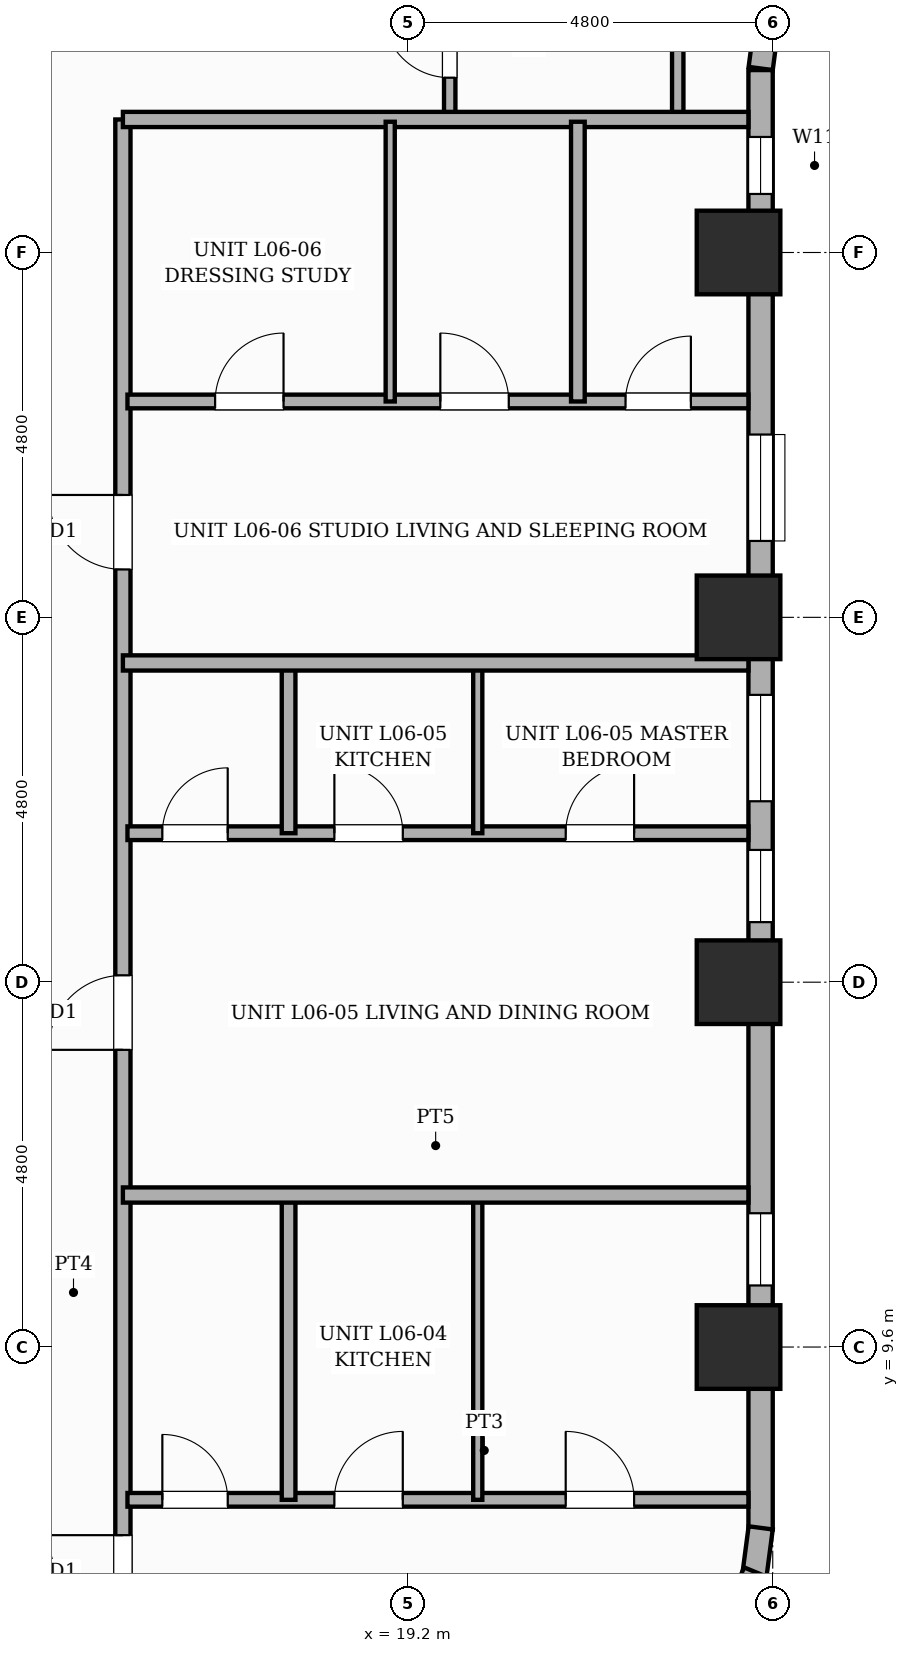
"""IFC4 building model, lengths in metres.
Left out: names, types, materials, properties, quantities, classifications, styles, units other than length and angle.
Written with IfcOpenShell. Run it as: python <this file> out.ifc"""

import sys

from ifc_helpers import new_model, si_unit, direction, frame, frame_2d, origin, origin_2d, place, context, subcontext, project, spatial, rectangle, extrude, element, fill, save


model = new_model("IFC4")
c1 = context("Model", 3, precision=1e-05, world=origin(), true_north=direction((0.0, 1.0)))
c2 = subcontext(c1, "Body", "Model", "MODEL_VIEW")
j1 = project(units=[si_unit("LENGTHUNIT", "METRE"), si_unit("PLANEANGLEUNIT", "RADIAN")], contexts=[c1])
p1 = place(None, origin())
s1 = spatial("IfcSite", under=j1, at=p1, CompositionType="ELEMENT")
p2 = place(p1, origin())
s2 = spatial("IfcBuilding", under=s1, at=p2, CompositionType="ELEMENT")
p3 = place(p2, frame((0.0, 0.0, 28.6)))
s3 = spatial("IfcBuildingStorey", under=s2, at=p3, CompositionType="ELEMENT", Elevation=28.6)
for number, where, z_axis, x_axis in (
    (1, (23.55, 9.6, 0.0), (0.0, 0.0, 1.0), (1.0, 0.0, 0.0)),
    (2, (23.55, 14.4, 0.0), (0.0, 0.0, 1.0), (1.0, 0.0, 0.0)),
    (3, (23.55, 19.2, 0.0), (0.0, 0.0, 1.0), (1.0, 0.0, 0.0)),
    (4, (23.55, 24.0, 0.0), (0.0, 0.0, 1.0), (1.0, 0.0, 0.0)),
):
    element("IfcColumn", number, at=place(p3, frame(where, z_axis=z_axis, x_axis=x_axis)), inside=s3, PredefinedType="COLUMN", context=c2, shape_type="SweptSolid", body=[
        extrude(rectangle(XDim=1.1, YDim=1.1, at=origin_2d()), origin(), (0.0, 0.0, 1.0), 3.6),
    ])
p4 = place(p3, frame((23.923, 27.042, 0.0), z_axis=(0.0, 0.0, 1.0), x_axis=(-0.130555323746, -0.9914410257, 0.0)))
e5 = element("IfcWall", 5, at=p4, inside=s3, PredefinedType="STANDARD", context=c2, shape_type="SweptSolid", body=[
    extrude(rectangle(XDim=0.626, YDim=0.32, at=frame_2d((0.313, 0.0))), origin(), (0.0, 0.0, 1.0), 2.53),
])
p5 = place(p3, frame((23.84, 26.4, 0.0), z_axis=(0.0, 0.0, 1.0), x_axis=(0.0, -1.0, 0.0)))
e6 = element("IfcWall", 6, at=p5, inside=s3, PredefinedType="STANDARD", context=c2, shape_type="SweptSolid", body=[
    extrude(rectangle(XDim=19.2, YDim=0.32, at=frame_2d((9.6, 0.0))), origin(), (0.0, 0.0, 1.0), 2.53),
])
p6 = place(p5, frame((15.04, 0.0, 0.45)))
e7 = element("IfcOpeningElement", 7, at=p6, cuts=e6, PredefinedType="OPENING", context=c2, shape_type="SweptSolid", body=[
    extrude(rectangle(XDim=0.95, YDim=1.8, at=frame_2d((0.475, 0.9))), frame((0.0, 0.17, 0.0), z_axis=(0.0, -1.0, 0.0), x_axis=(1.0, 0.0, 0.0)), (0.0, 0.0, 1.0), 0.34),
])
p7 = place(p5, frame((8.22, 0.0, 0.65)))
e8 = element("IfcOpeningElement", 8, at=p7, cuts=e6, PredefinedType="OPENING", context=c2, shape_type="SweptSolid", body=[
    extrude(rectangle(XDim=1.4, YDim=1.1, at=frame_2d((0.7, 0.55))), frame((0.0, 0.17, 0.0), z_axis=(0.0, -1.0, 0.0), x_axis=(1.0, 0.0, 0.0)), (0.0, 0.0, 1.0), 0.34),
])
p8 = place(p5, frame((4.795, 0.0, 0.65)))
e9 = element("IfcOpeningElement", 9, at=p8, cuts=e6, PredefinedType="OPENING", context=c2, shape_type="SweptSolid", body=[
    extrude(rectangle(XDim=1.4, YDim=1.1, at=frame_2d((0.7, 0.55))), frame((0.0, 0.17, 0.0), z_axis=(0.0, -1.0, 0.0), x_axis=(1.0, 0.0, 0.0)), (0.0, 0.0, 1.0), 0.34),
])
p9 = place(p5, frame((10.26, 0.0, 0.45)))
e10 = element("IfcOpeningElement", 10, at=p9, cuts=e6, PredefinedType="OPENING", context=c2, shape_type="SweptSolid", body=[
    extrude(rectangle(XDim=0.95, YDim=1.8, at=frame_2d((0.475, 0.9))), frame((0.0, 0.17, 0.0), z_axis=(0.0, -1.0, 0.0), x_axis=(1.0, 0.0, 0.0)), (0.0, 0.0, 1.0), 0.34),
])
p10 = place(p5, frame((0.88, 0.0, 0.45)))
e11 = element("IfcOpeningElement", 11, at=p10, cuts=e6, PredefinedType="OPENING", context=c2, shape_type="SweptSolid", body=[
    extrude(rectangle(XDim=0.75, YDim=1.8, at=frame_2d((0.375, 0.9))), frame((0.0, 0.17, 0.0), z_axis=(0.0, -1.0, 0.0), x_axis=(1.0, 0.0, 0.0)), (0.0, 0.0, 1.0), 0.34),
])
p11 = place(p3, frame((23.841, 7.221, 0.0), z_axis=(0.0, 0.0, 1.0), x_axis=(-0.130504898859, -0.991447664465, 0.0)))
e12 = element("IfcWall", 12, at=p11, inside=s3, PredefinedType="STANDARD", context=c2, shape_type="SweptSolid", body=[
    extrude(rectangle(XDim=0.627, YDim=0.32, at=frame_2d((0.313, 0.0))), origin(), (0.0, 0.0, 1.0), 3.35),
])
p12 = place(p3, frame((23.771, 6.64, 0.0), z_axis=(0.0, 0.0, 1.0), x_axis=(-0.382787856107, -0.923836271867, 0.0)))
e13 = element("IfcWall", 13, at=p12, inside=s3, PredefinedType="STANDARD", context=c2, shape_type="SweptSolid", body=[
    extrude(rectangle(XDim=0.626, YDim=0.32, at=frame_2d((0.313, 0.0))), origin(), (0.0, 0.0, 1.0), 3.35),
])
p13 = place(p3, frame((19.75, 25.75, 0.0), z_axis=(0.0, 0.0, 1.0), x_axis=(0.0, 1.0, 0.0)))
e14 = element("IfcWall", 14, at=p13, inside=s3, PredefinedType="PARTITIONING", context=c2, shape_type="SweptSolid", body=[
    extrude(rectangle(XDim=2.25, YDim=0.15, at=frame_2d((1.125, 0.0))), origin(), (0.0, 0.0, 1.0), 3.35),
])
p14 = place(p13, frame((0.55, 0.0, 0.0)))
e15 = element("IfcOpeningElement", 15, at=p14, cuts=e14, PredefinedType="OPENING", context=c2, shape_type="SweptSolid", body=[
    extrude(rectangle(XDim=0.88, YDim=2.1, at=frame_2d((0.44, 1.05))), frame((0.0, 0.085, 0.0), z_axis=(0.0, -1.0, 0.0), x_axis=(1.0, 0.0, 0.0)), (0.0, 0.0, 1.0), 0.17),
])
p15 = place(p3, frame((22.75, 25.75, 0.0), z_axis=(0.0, 0.0, 1.0), x_axis=(0.0, 1.0, 0.0)))
e16 = element("IfcWall", 16, at=p15, inside=s3, PredefinedType="PARTITIONING", context=c2, shape_type="SweptSolid", body=[
    extrude(rectangle(XDim=2.25, YDim=0.15, at=frame_2d((1.125, 0.0))), origin(), (0.0, 0.0, 1.0), 3.35),
])
p16 = place(p3, frame((15.45, 5.12, 0.0), z_axis=(0.0, 0.0, 1.0), x_axis=(0.0, 1.0, 0.0)))
e17 = element("IfcWall", 17, at=p16, inside=s3, PredefinedType="PARTITIONING", context=c2, shape_type="SweptSolid", body=[
    extrude(rectangle(XDim=20.63, YDim=0.2, at=frame_2d((10.315, 0.0))), origin(), (0.0, 0.0, 1.0), 3.35),
])
p17 = place(p16, frame((1.025, 0.0, 0.0)))
e18 = element("IfcOpeningElement", 18, at=p17, cuts=e17, PredefinedType="OPENING", context=c2, shape_type="SweptSolid", body=[
    extrude(rectangle(XDim=0.98, YDim=2.18, at=frame_2d((0.49, 1.09))), frame((0.0, 0.11, 0.0), z_axis=(0.0, -1.0, 0.0), x_axis=(1.0, 0.0, 0.0)), (0.0, 0.0, 1.0), 0.22),
])
p18 = place(p16, frame((8.39, 0.0, 0.0)))
e19 = element("IfcOpeningElement", 19, at=p18, cuts=e17, PredefinedType="OPENING", context=c2, shape_type="SweptSolid", body=[
    extrude(rectangle(XDim=0.98, YDim=2.18, at=frame_2d((0.49, 1.09))), frame((0.0, 0.11, 0.0), z_axis=(0.0, -1.0, 0.0), x_axis=(1.0, 0.0, 0.0)), (0.0, 0.0, 1.0), 0.22),
])
p19 = place(p16, frame((14.71, 0.0, 0.0)))
e20 = element("IfcOpeningElement", 20, at=p19, cuts=e17, PredefinedType="OPENING", context=c2, shape_type="SweptSolid", body=[
    extrude(rectangle(XDim=0.98, YDim=2.18, at=frame_2d((0.49, 1.09))), frame((0.0, 0.11, 0.0), z_axis=(0.0, -1.0, 0.0), x_axis=(1.0, 0.0, 0.0)), (0.0, 0.0, 1.0), 0.22),
])
p20 = place(p3, frame((15.45, 25.75, 0.0), z_axis=(0.0, 0.0, 1.0), x_axis=(1.0, 0.0, 0.0)))
e21 = element("IfcWall", 21, at=p20, inside=s3, PredefinedType="PARTITIONING", context=c2, shape_type="SweptSolid", body=[
    extrude(rectangle(XDim=8.23, YDim=0.2, at=frame_2d((4.115, 0.0))), origin(), (0.0, 0.0, 1.0), 3.35),
])
p21 = place(p3, frame((15.51, 7.59, 0.0), z_axis=(0.0, 0.0, 1.0), x_axis=(1.0, 0.0, 0.0)))
e22 = element("IfcWall", 22, at=p21, inside=s3, PredefinedType="PLUMBINGWALL", context=c2, shape_type="SweptSolid", body=[
    extrude(rectangle(XDim=8.17, YDim=0.18, at=frame_2d((4.085, 0.0))), origin(), (0.0, 0.0, 1.0), 3.35),
])
p22 = place(p21, frame((0.459, 0.0, 0.0)))
e23 = element("IfcOpeningElement", 23, at=p22, cuts=e22, PredefinedType="OPENING", context=c2, shape_type="SweptSolid", body=[
    extrude(rectangle(XDim=0.86, YDim=2.1, at=frame_2d((0.43, 1.05))), frame((0.0, 0.1, 0.0), z_axis=(0.0, -1.0, 0.0), x_axis=(1.0, 0.0, 0.0)), (0.0, 0.0, 1.0), 0.2),
])
p23 = place(p21, frame((2.722, 0.0, 0.0)))
e24 = element("IfcOpeningElement", 24, at=p23, cuts=e22, PredefinedType="OPENING", context=c2, shape_type="SweptSolid", body=[
    extrude(rectangle(XDim=0.9, YDim=2.15, at=frame_2d((0.45, 1.075))), frame((0.0, 0.1, 0.0), z_axis=(0.0, -1.0, 0.0), x_axis=(1.0, 0.0, 0.0)), (0.0, 0.0, 1.0), 0.2),
])
p24 = place(p21, frame((5.766, 0.0, 0.0)))
e25 = element("IfcOpeningElement", 25, at=p24, cuts=e22, PredefinedType="OPENING", context=c2, shape_type="SweptSolid", body=[
    extrude(rectangle(XDim=0.9, YDim=2.15, at=frame_2d((0.45, 1.075))), frame((0.0, 0.1, 0.0), z_axis=(0.0, -1.0, 0.0), x_axis=(1.0, 0.0, 0.0)), (0.0, 0.0, 1.0), 0.2),
])
p25 = place(p3, frame((17.63, 7.59, 0.0), z_axis=(0.0, 0.0, 1.0), x_axis=(0.0, 1.0, 0.0)))
e26 = element("IfcWall", 26, at=p25, inside=s3, PredefinedType="PLUMBINGWALL", context=c2, shape_type="SweptSolid", body=[
    extrude(rectangle(XDim=4.05, YDim=0.18, at=frame_2d((2.025, 0.0))), origin(), (0.0, 0.0, 1.0), 3.35),
])
p26 = place(p3, frame((20.119, 7.59, 0.0), z_axis=(0.0, 0.0, 1.0), x_axis=(0.0, 1.0, 0.0)))
e27 = element("IfcWall", 27, at=p26, inside=s3, PredefinedType="PARTITIONING", context=c2, shape_type="SweptSolid", body=[
    extrude(rectangle(XDim=4.05, YDim=0.12, at=frame_2d((2.025, 0.0))), origin(), (0.0, 0.0, 1.0), 3.35),
])
p27 = place(p3, frame((15.45, 11.6, 0.0), z_axis=(0.0, 0.0, 1.0), x_axis=(1.0, 0.0, 0.0)))
e28 = element("IfcWall", 28, at=p27, inside=s3, PredefinedType="SOLIDWALL", context=c2, shape_type="SweptSolid", body=[
    extrude(rectangle(XDim=8.23, YDim=0.2, at=frame_2d((4.115, 0.0))), origin(), (0.0, 0.0, 1.0), 3.35),
])
p28 = place(p3, frame((15.51, 16.36, 0.0), z_axis=(0.0, 0.0, 1.0), x_axis=(1.0, 0.0, 0.0)))
e29 = element("IfcWall", 29, at=p28, inside=s3, PredefinedType="PLUMBINGWALL", context=c2, shape_type="SweptSolid", body=[
    extrude(rectangle(XDim=8.17, YDim=0.18, at=frame_2d((4.085, 0.0))), origin(), (0.0, 0.0, 1.0), 3.35),
])
p29 = place(p28, frame((0.459, 0.0, 0.0)))
e30 = element("IfcOpeningElement", 30, at=p29, cuts=e29, PredefinedType="OPENING", context=c2, shape_type="SweptSolid", body=[
    extrude(rectangle(XDim=0.86, YDim=2.1, at=frame_2d((0.43, 1.05))), frame((0.0, 0.1, 0.0), z_axis=(0.0, -1.0, 0.0), x_axis=(1.0, 0.0, 0.0)), (0.0, 0.0, 1.0), 0.2),
])
p30 = place(p28, frame((2.722, 0.0, 0.0)))
e31 = element("IfcOpeningElement", 31, at=p30, cuts=e29, PredefinedType="OPENING", context=c2, shape_type="SweptSolid", body=[
    extrude(rectangle(XDim=0.9, YDim=2.15, at=frame_2d((0.45, 1.075))), frame((0.0, 0.1, 0.0), z_axis=(0.0, -1.0, 0.0), x_axis=(1.0, 0.0, 0.0)), (0.0, 0.0, 1.0), 0.2),
])
p31 = place(p28, frame((5.766, 0.0, 0.0)))
e32 = element("IfcOpeningElement", 32, at=p31, cuts=e29, PredefinedType="OPENING", context=c2, shape_type="SweptSolid", body=[
    extrude(rectangle(XDim=0.9, YDim=2.15, at=frame_2d((0.45, 1.075))), frame((0.0, 0.1, 0.0), z_axis=(0.0, -1.0, 0.0), x_axis=(1.0, 0.0, 0.0)), (0.0, 0.0, 1.0), 0.2),
])
p32 = place(p3, frame((17.63, 16.36, 0.0), z_axis=(0.0, 0.0, 1.0), x_axis=(0.0, 1.0, 0.0)))
e33 = element("IfcWall", 33, at=p32, inside=s3, PredefinedType="PLUMBINGWALL", context=c2, shape_type="SweptSolid", body=[
    extrude(rectangle(XDim=2.28, YDim=0.18, at=frame_2d((1.14, 0.0))), origin(), (0.0, 0.0, 1.0), 3.35),
])
p33 = place(p3, frame((20.119, 16.36, 0.0), z_axis=(0.0, 0.0, 1.0), x_axis=(0.0, 1.0, 0.0)))
e34 = element("IfcWall", 34, at=p33, inside=s3, PredefinedType="PARTITIONING", context=c2, shape_type="SweptSolid", body=[
    extrude(rectangle(XDim=2.28, YDim=0.12, at=frame_2d((1.14, 0.0))), origin(), (0.0, 0.0, 1.0), 3.35),
])
p34 = place(p3, frame((15.45, 18.6, 0.0), z_axis=(0.0, 0.0, 1.0), x_axis=(1.0, 0.0, 0.0)))
e35 = element("IfcWall", 35, at=p34, inside=s3, PredefinedType="SOLIDWALL", context=c2, shape_type="SweptSolid", body=[
    extrude(rectangle(XDim=8.23, YDim=0.2, at=frame_2d((4.115, 0.0))), origin(), (0.0, 0.0, 1.0), 3.35),
])
p35 = place(p3, frame((15.51, 22.04, 0.0), z_axis=(0.0, 0.0, 1.0), x_axis=(1.0, 0.0, 0.0)))
e36 = element("IfcWall", 36, at=p35, inside=s3, PredefinedType="PLUMBINGWALL", context=c2, shape_type="SweptSolid", body=[
    extrude(rectangle(XDim=8.17, YDim=0.18, at=frame_2d((4.085, 0.0))), origin(), (0.0, 0.0, 1.0), 3.35),
])
p36 = place(p35, frame((1.154, 0.0, 0.0)))
e37 = element("IfcOpeningElement", 37, at=p36, cuts=e36, PredefinedType="OPENING", context=c2, shape_type="SweptSolid", body=[
    extrude(rectangle(XDim=0.9, YDim=2.15, at=frame_2d((0.45, 1.075))), frame((0.0, 0.1, 0.0), z_axis=(0.0, -1.0, 0.0), x_axis=(1.0, 0.0, 0.0)), (0.0, 0.0, 1.0), 0.2),
])
p37 = place(p35, frame((4.116, 0.0, 0.0)))
e38 = element("IfcOpeningElement", 38, at=p37, cuts=e36, PredefinedType="OPENING", context=c2, shape_type="SweptSolid", body=[
    extrude(rectangle(XDim=0.9, YDim=2.15, at=frame_2d((0.45, 1.075))), frame((0.0, 0.1, 0.0), z_axis=(0.0, -1.0, 0.0), x_axis=(1.0, 0.0, 0.0)), (0.0, 0.0, 1.0), 0.2),
])
p38 = place(p35, frame((6.553, 0.0, 0.0)))
e39 = element("IfcOpeningElement", 39, at=p38, cuts=e36, PredefinedType="OPENING", context=c2, shape_type="SweptSolid", body=[
    extrude(rectangle(XDim=0.86, YDim=2.1, at=frame_2d((0.43, 1.05))), frame((0.0, 0.1, 0.0), z_axis=(0.0, -1.0, 0.0), x_axis=(1.0, 0.0, 0.0)), (0.0, 0.0, 1.0), 0.2),
])
p39 = place(p3, frame((18.967, 22.04, 0.0), z_axis=(0.0, 0.0, 1.0), x_axis=(0.0, 1.0, 0.0)))
e40 = element("IfcWall", 40, at=p39, inside=s3, PredefinedType="PARTITIONING", context=c2, shape_type="SweptSolid", body=[
    extrude(rectangle(XDim=3.68, YDim=0.12, at=frame_2d((1.84, 0.0))), origin(), (0.0, 0.0, 1.0), 3.35),
])
p40 = place(p3, frame((21.436, 22.04, 0.0), z_axis=(0.0, 0.0, 1.0), x_axis=(0.0, 1.0, 0.0)))
e41 = element("IfcWall", 41, at=p40, inside=s3, PredefinedType="PLUMBINGWALL", context=c2, shape_type="SweptSolid", body=[
    extrude(rectangle(XDim=3.68, YDim=0.18, at=frame_2d((1.84, 0.0))), origin(), (0.0, 0.0, 1.0), 3.35),
])
p41 = place(p6, origin())
e42 = element("IfcWindow", 42, at=p41, inside=s3, PartitioningType="SINGLE_PANEL", PredefinedType="WINDOW", context=c2, shape_type="SweptSolid", body=[
    extrude(rectangle(XDim=0.95, YDim=1.8, at=frame_2d((0.475, 0.9))), frame((0.0, 0.03, 0.0), z_axis=(0.0, -1.0, 0.0), x_axis=(1.0, 0.0, 0.0)), (0.0, 0.0, 1.0), 0.06),
])
fill(e7, e42)
p42 = place(p7, origin())
e43 = element("IfcWindow", 43, at=p42, inside=s3, PartitioningType="SINGLE_PANEL", PredefinedType="WINDOW", context=c2, shape_type="SweptSolid", body=[
    extrude(rectangle(XDim=1.4, YDim=1.1, at=frame_2d((0.7, 0.55))), frame((0.0, 0.03, 0.0), z_axis=(0.0, -1.0, 0.0), x_axis=(1.0, 0.0, 0.0)), (0.0, 0.0, 1.0), 0.06),
])
fill(e8, e43)
p43 = place(p8, origin())
e44 = element("IfcWindow", 44, at=p43, inside=s3, PartitioningType="SINGLE_PANEL", PredefinedType="WINDOW", context=c2, shape_type="SweptSolid", body=[
    extrude(rectangle(XDim=1.4, YDim=1.1, at=frame_2d((0.7, 0.55))), frame((0.0, 0.03, 0.0), z_axis=(0.0, -1.0, 0.0), x_axis=(1.0, 0.0, 0.0)), (0.0, 0.0, 1.0), 0.06),
])
fill(e9, e44)
p44 = place(p9, origin())
e45 = element("IfcWindow", 45, at=p44, inside=s3, PartitioningType="SINGLE_PANEL", PredefinedType="WINDOW", context=c2, shape_type="SweptSolid", body=[
    extrude(rectangle(XDim=0.95, YDim=1.8, at=frame_2d((0.475, 0.9))), frame((0.0, 0.03, 0.0), z_axis=(0.0, -1.0, 0.0), x_axis=(1.0, 0.0, 0.0)), (0.0, 0.0, 1.0), 0.06),
])
fill(e10, e45)
p45 = place(p10, origin())
e46 = element("IfcWindow", 46, at=p45, inside=s3, PartitioningType="SINGLE_PANEL", PredefinedType="WINDOW", context=c2, shape_type="SweptSolid", body=[
    extrude(rectangle(XDim=0.75, YDim=1.8, at=frame_2d((0.375, 0.9))), frame((0.0, 0.03, 0.0), z_axis=(0.0, -1.0, 0.0), x_axis=(1.0, 0.0, 0.0)), (0.0, 0.0, 1.0), 0.06),
])
fill(e11, e46)
p46 = place(p14, origin())
e47 = element("IfcDoor", 47, at=p46, inside=s3, OperationType="SINGLE_SWING_RIGHT", PredefinedType="DOOR", context=c2, shape_type="SweptSolid", body=[
    extrude(rectangle(XDim=0.88, YDim=2.1, at=frame_2d((0.44, 1.05))), frame((0.0, 0.025, 0.0), z_axis=(0.0, -1.0, 0.0), x_axis=(1.0, 0.0, 0.0)), (0.0, 0.0, 1.0), 0.05),
])
fill(e15, e47)
p47 = place(p17, origin())
e48 = element("IfcDoor", 48, at=p47, inside=s3, OperationType="SINGLE_SWING_RIGHT", PredefinedType="DOOR", context=c2, shape_type="SweptSolid", body=[
    extrude(rectangle(XDim=0.98, YDim=2.18, at=frame_2d((0.49, 1.09))), frame((0.0, 0.025, 0.0), z_axis=(0.0, -1.0, 0.0), x_axis=(1.0, 0.0, 0.0)), (0.0, 0.0, 1.0), 0.05),
])
fill(e18, e48)
p48 = place(p22, origin())
e49 = element("IfcDoor", 49, at=p48, inside=s3, OperationType="SINGLE_SWING_LEFT", PredefinedType="DOOR", context=c2, shape_type="SweptSolid", body=[
    extrude(rectangle(XDim=0.86, YDim=2.1, at=frame_2d((0.43, 1.05))), frame((0.0, 0.025, 0.0), z_axis=(0.0, -1.0, 0.0), x_axis=(1.0, 0.0, 0.0)), (0.0, 0.0, 1.0), 0.05),
])
fill(e23, e49)
p49 = place(p23, origin())
e50 = element("IfcDoor", 50, at=p49, inside=s3, OperationType="SINGLE_SWING_RIGHT", PredefinedType="DOOR", context=c2, shape_type="SweptSolid", body=[
    extrude(rectangle(XDim=0.9, YDim=2.15, at=frame_2d((0.45, 1.075))), frame((0.0, 0.025, 0.0), z_axis=(0.0, -1.0, 0.0), x_axis=(1.0, 0.0, 0.0)), (0.0, 0.0, 1.0), 0.05),
])
fill(e24, e50)
p50 = place(p24, origin())
e51 = element("IfcDoor", 51, at=p50, inside=s3, OperationType="SINGLE_SWING_LEFT", PredefinedType="DOOR", context=c2, shape_type="SweptSolid", body=[
    extrude(rectangle(XDim=0.9, YDim=2.15, at=frame_2d((0.45, 1.075))), frame((0.0, 0.025, 0.0), z_axis=(0.0, -1.0, 0.0), x_axis=(1.0, 0.0, 0.0)), (0.0, 0.0, 1.0), 0.05),
])
fill(e25, e51)
p51 = place(p18, origin())
e52 = element("IfcDoor", 52, at=p51, inside=s3, OperationType="SINGLE_SWING_LEFT", PredefinedType="DOOR", context=c2, shape_type="SweptSolid", body=[
    extrude(rectangle(XDim=0.98, YDim=2.18, at=frame_2d((0.49, 1.09))), frame((0.0, 0.025, 0.0), z_axis=(0.0, -1.0, 0.0), x_axis=(1.0, 0.0, 0.0)), (0.0, 0.0, 1.0), 0.05),
])
fill(e19, e52)
p52 = place(p29, origin())
e53 = element("IfcDoor", 53, at=p52, inside=s3, OperationType="SINGLE_SWING_RIGHT", PredefinedType="DOOR", context=c2, shape_type="SweptSolid", body=[
    extrude(rectangle(XDim=0.86, YDim=2.1, at=frame_2d((0.43, 1.05))), frame((0.0, 0.025, 0.0), z_axis=(0.0, -1.0, 0.0), x_axis=(1.0, 0.0, 0.0)), (0.0, 0.0, 1.0), 0.05),
])
fill(e30, e53)
p53 = place(p30, origin())
e54 = element("IfcDoor", 54, at=p53, inside=s3, OperationType="SINGLE_SWING_LEFT", PredefinedType="DOOR", context=c2, shape_type="SweptSolid", body=[
    extrude(rectangle(XDim=0.9, YDim=2.15, at=frame_2d((0.45, 1.075))), frame((0.0, 0.025, 0.0), z_axis=(0.0, -1.0, 0.0), x_axis=(1.0, 0.0, 0.0)), (0.0, 0.0, 1.0), 0.05),
])
fill(e31, e54)
p54 = place(p31, origin())
e55 = element("IfcDoor", 55, at=p54, inside=s3, OperationType="SINGLE_SWING_RIGHT", PredefinedType="DOOR", context=c2, shape_type="SweptSolid", body=[
    extrude(rectangle(XDim=0.9, YDim=2.15, at=frame_2d((0.45, 1.075))), frame((0.0, 0.025, 0.0), z_axis=(0.0, -1.0, 0.0), x_axis=(1.0, 0.0, 0.0)), (0.0, 0.0, 1.0), 0.05),
])
fill(e32, e55)
p55 = place(p19, origin())
e56 = element("IfcDoor", 56, at=p55, inside=s3, OperationType="SINGLE_SWING_RIGHT", PredefinedType="DOOR", context=c2, shape_type="SweptSolid", body=[
    extrude(rectangle(XDim=0.98, YDim=2.18, at=frame_2d((0.49, 1.09))), frame((0.0, 0.025, 0.0), z_axis=(0.0, -1.0, 0.0), x_axis=(1.0, 0.0, 0.0)), (0.0, 0.0, 1.0), 0.05),
])
fill(e20, e56)
p56 = place(p36, origin())
e57 = element("IfcDoor", 57, at=p56, inside=s3, OperationType="SINGLE_SWING_RIGHT", PredefinedType="DOOR", context=c2, shape_type="SweptSolid", body=[
    extrude(rectangle(XDim=0.9, YDim=2.15, at=frame_2d((0.45, 1.075))), frame((0.0, 0.025, 0.0), z_axis=(0.0, -1.0, 0.0), x_axis=(1.0, 0.0, 0.0)), (0.0, 0.0, 1.0), 0.05),
])
fill(e37, e57)
p57 = place(p37, origin())
e58 = element("IfcDoor", 58, at=p57, inside=s3, OperationType="SINGLE_SWING_LEFT", PredefinedType="DOOR", context=c2, shape_type="SweptSolid", body=[
    extrude(rectangle(XDim=0.9, YDim=2.15, at=frame_2d((0.45, 1.075))), frame((0.0, 0.025, 0.0), z_axis=(0.0, -1.0, 0.0), x_axis=(1.0, 0.0, 0.0)), (0.0, 0.0, 1.0), 0.05),
])
fill(e38, e58)
p58 = place(p38, origin())
e59 = element("IfcDoor", 59, at=p58, inside=s3, OperationType="SINGLE_SWING_RIGHT", PredefinedType="DOOR", context=c2, shape_type="SweptSolid", body=[
    extrude(rectangle(XDim=0.86, YDim=2.1, at=frame_2d((0.43, 1.05))), frame((0.0, 0.025, 0.0), z_axis=(0.0, -1.0, 0.0), x_axis=(1.0, 0.0, 0.0)), (0.0, 0.0, 1.0), 0.05),
])
fill(e39, e59)
save(model, sys.argv[1])
